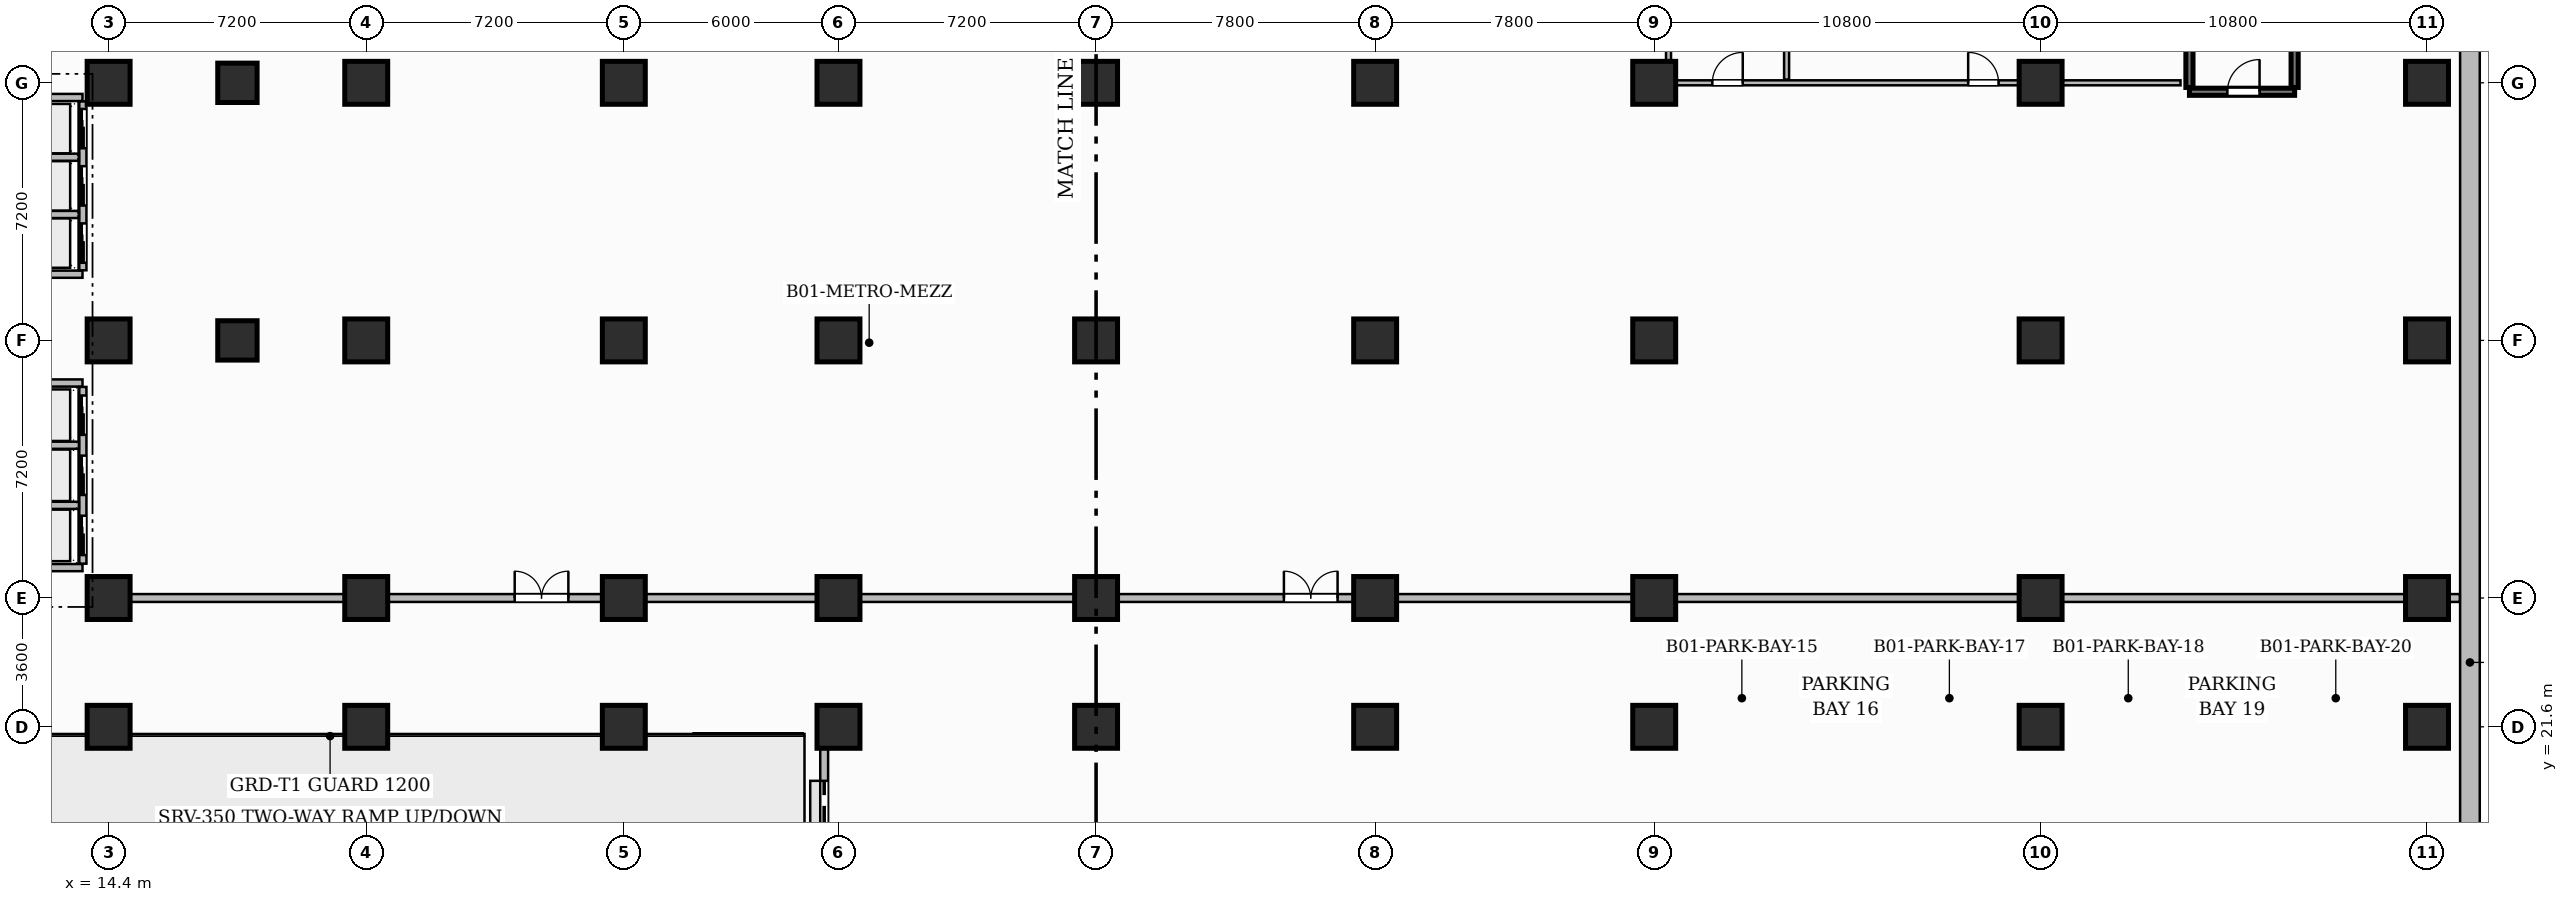
"""IFC4 building model, lengths in metres.
Left out: names, types, materials, properties, quantities, classifications, styles, units other than length and angle.
Written with IfcOpenShell. Run it as: python <this file> out.ifc"""

import sys

from ifc_helpers import new_model, si_unit, direction, frame, frame_2d, origin, origin_2d, place, context, subcontext, project, spatial, rectangle, extrude, source, transform, mapped, element, fill, save


model = new_model("IFC4")
c1 = context("Model", 3, precision=1e-05, world=origin(), true_north=direction((0.0, 1.0)))
c2 = subcontext(c1, "Body", "Model", "MODEL_VIEW")
j1 = project(units=[si_unit("LENGTHUNIT", "METRE"), si_unit("PLANEANGLEUNIT", "RADIAN")], contexts=[c1])
p1 = place(None, origin())
s1 = spatial("IfcSite", under=j1, at=p1, CompositionType="ELEMENT")
p2 = place(p1, origin())
s2 = spatial("IfcBuilding", under=s1, at=p2, CompositionType="ELEMENT")
p3 = place(p2, frame((0.0, 0.0, -6.5)))
s3 = spatial("IfcBuildingStorey", under=s2, at=p3, CompositionType="ELEMENT", Elevation=-6.5)
p4 = place(p3, frame((80.4, 0.35, 0.0), z_axis=(0.0, 0.0, 1.0), x_axis=(0.0, 1.0, 0.0)))
e1 = element("IfcWall", 1, at=p4, inside=s3, PredefinedType="USERDEFINED", context=c2, shape_type="SweptSolid", body=[
    extrude(rectangle(XDim=46.1, YDim=0.55, at=frame_2d((23.05, 0.0))), origin(), (0.0, 0.0, 1.0), 6.5),
])
m1 = source(origin(), c2, "Body", "SweptSolid", [
    extrude(rectangle(XDim=1.2, YDim=1.2, at=origin_2d()), origin(), (0.0, 0.0, 1.0), 6.5),
])
for number, where, z_axis, x_axis in (
    (2, (14.4, 21.6, 0.0), (0.0, 0.0, 1.0), (1.0, 0.0, 0.0)),
    (3, (14.4, 25.2, 0.0), (0.0, 0.0, 1.0), (1.0, 0.0, 0.0)),
    (4, (14.4, 32.4, 0.0), (0.0, 0.0, 1.0), (1.0, 0.0, 0.0)),
    (5, (14.4, 39.6, 0.0), (0.0, 0.0, 1.0), (1.0, 0.0, 0.0)),
    (6, (21.6, 21.6, 0.0), (0.0, 0.0, 1.0), (1.0, 0.0, 0.0)),
    (7, (21.6, 25.2, 0.0), (0.0, 0.0, 1.0), (1.0, 0.0, 0.0)),
    (8, (21.6, 32.4, 0.0), (0.0, 0.0, 1.0), (1.0, 0.0, 0.0)),
    (9, (21.6, 39.6, 0.0), (0.0, 0.0, 1.0), (1.0, 0.0, 0.0)),
    (10, (28.8, 21.6, 0.0), (0.0, 0.0, 1.0), (1.0, 0.0, 0.0)),
    (11, (28.8, 25.2, 0.0), (0.0, 0.0, 1.0), (1.0, 0.0, 0.0)),
    (12, (28.8, 32.4, 0.0), (0.0, 0.0, 1.0), (1.0, 0.0, 0.0)),
    (13, (28.8, 39.6, 0.0), (0.0, 0.0, 1.0), (1.0, 0.0, 0.0)),
    (14, (34.8, 21.6, 0.0), (0.0, 0.0, 1.0), (1.0, 0.0, 0.0)),
    (15, (34.8, 25.2, 0.0), (0.0, 0.0, 1.0), (1.0, 0.0, 0.0)),
    (16, (34.8, 32.4, 0.0), (0.0, 0.0, 1.0), (1.0, 0.0, 0.0)),
    (17, (34.8, 39.6, 0.0), (0.0, 0.0, 1.0), (1.0, 0.0, 0.0)),
    (18, (42.0, 21.6, 0.0), (0.0, 0.0, 1.0), (1.0, 0.0, 0.0)),
    (19, (42.0, 25.2, 0.0), (0.0, 0.0, 1.0), (1.0, 0.0, 0.0)),
    (20, (42.0, 32.4, 0.0), (0.0, 0.0, 1.0), (1.0, 0.0, 0.0)),
    (21, (42.0, 39.6, 0.0), (0.0, 0.0, 1.0), (1.0, 0.0, 0.0)),
    (22, (49.8, 21.6, 0.0), (0.0, 0.0, 1.0), (1.0, 0.0, 0.0)),
    (23, (49.8, 25.2, 0.0), (0.0, 0.0, 1.0), (1.0, 0.0, 0.0)),
    (24, (49.8, 32.4, 0.0), (0.0, 0.0, 1.0), (1.0, 0.0, 0.0)),
    (25, (49.8, 39.6, 0.0), (0.0, 0.0, 1.0), (1.0, 0.0, 0.0)),
    (26, (57.6, 21.6, 0.0), (0.0, 0.0, 1.0), (1.0, 0.0, 0.0)),
    (27, (57.6, 25.2, 0.0), (0.0, 0.0, 1.0), (1.0, 0.0, 0.0)),
    (28, (57.6, 32.4, 0.0), (0.0, 0.0, 1.0), (1.0, 0.0, 0.0)),
    (29, (57.6, 39.6, 0.0), (0.0, 0.0, 1.0), (1.0, 0.0, 0.0)),
    (30, (68.4, 21.6, 0.0), (0.0, 0.0, 1.0), (1.0, 0.0, 0.0)),
    (31, (68.4, 25.2, 0.0), (0.0, 0.0, 1.0), (1.0, 0.0, 0.0)),
    (32, (68.4, 32.4, 0.0), (0.0, 0.0, 1.0), (1.0, 0.0, 0.0)),
    (33, (68.4, 39.6, 0.0), (0.0, 0.0, 1.0), (1.0, 0.0, 0.0)),
    (34, (79.2, 21.6, 0.0), (0.0, 0.0, 1.0), (1.0, 0.0, 0.0)),
    (35, (79.2, 25.2, 0.0), (0.0, 0.0, 1.0), (1.0, 0.0, 0.0)),
    (36, (79.2, 32.4, 0.0), (0.0, 0.0, 1.0), (1.0, 0.0, 0.0)),
    (37, (79.2, 39.6, 0.0), (0.0, 0.0, 1.0), (1.0, 0.0, 0.0)),
):
    element("IfcColumn", number, at=place(p3, frame(where, z_axis=z_axis, x_axis=x_axis)), inside=s3, PredefinedType="COLUMN", context=c2, shape_type="MappedRepresentation", body=[
        mapped(m1, transform((0.0, 0.0, 0.0), scale=1.0)),
    ])
m2 = source(origin(), c2, "Body", "SweptSolid", [
    extrude(rectangle(XDim=1.1, YDim=1.1, at=origin_2d()), origin(), (0.0, 0.0, 1.0), 6.5),
])
for number, where, z_axis, x_axis in (
    (38, (18.0, 32.4, 0.0), (0.0, 0.0, 1.0), (1.0, 0.0, 0.0)),
    (39, (18.0, 39.6, 0.0), (0.0, 0.0, 1.0), (1.0, 0.0, 0.0)),
):
    element("IfcColumn", number, at=place(p3, frame(where, z_axis=z_axis, x_axis=x_axis)), inside=s3, PredefinedType="COLUMN", context=c2, shape_type="MappedRepresentation", body=[
        mapped(m2, transform((0.0, 0.0, 0.0), scale=1.0)),
    ])
for number, where, z_axis, x_axis in (
    (40, (11.71, 26.05, 0.0), (0.0, 0.0, 1.0), (1.0, 0.0, 0.0)),
    (41, (11.71, 31.21, 0.0), (0.0, 0.0, 1.0), (1.0, 0.0, 0.0)),
):
    element("IfcWall", number, at=place(p3, frame(where, z_axis=z_axis, x_axis=x_axis)), inside=s3, PredefinedType="PARTITIONING", context=c2, shape_type="SweptSolid", body=[
        extrude(rectangle(XDim=1.96, YDim=0.2, at=frame_2d((0.98, 0.0))), origin(), (0.0, 0.0, 1.0), 6.1),
    ])
p5 = place(p3, frame((13.68, 26.16, 0.0), z_axis=(0.0, 0.0, 1.0), x_axis=(0.0, 1.0, 0.0)))
e42 = element("IfcWall", 42, at=p5, inside=s3, PredefinedType="PARTITIONING", context=c2, shape_type="SweptSolid", body=[
    extrude(rectangle(XDim=4.94, YDim=0.2, at=frame_2d((2.47, 0.0))), origin(), (0.0, 0.0, 1.0), 6.1),
])
p6 = place(p5, frame((0.24, 0.0, 0.0)))
e43 = element("IfcOpeningElement", 43, at=p6, cuts=e42, PredefinedType="OPENING", context=c2, shape_type="SweptSolid", body=[
    extrude(rectangle(XDim=1.1, YDim=2.2, at=frame_2d((0.55, 1.1))), frame((0.0, 0.11, 0.0), z_axis=(0.0, -1.0, 0.0), x_axis=(1.0, 0.0, 0.0)), (0.0, 0.0, 1.0), 0.22),
])
p7 = place(p5, frame((1.92, 0.0, 0.0)))
e44 = element("IfcOpeningElement", 44, at=p7, cuts=e42, PredefinedType="OPENING", context=c2, shape_type="SweptSolid", body=[
    extrude(rectangle(XDim=1.1, YDim=2.2, at=frame_2d((0.55, 1.1))), frame((0.0, 0.11, 0.0), z_axis=(0.0, -1.0, 0.0), x_axis=(1.0, 0.0, 0.0)), (0.0, 0.0, 1.0), 0.22),
])
p8 = place(p5, frame((3.6, 0.0, 0.0)))
e45 = element("IfcOpeningElement", 45, at=p8, cuts=e42, PredefinedType="OPENING", context=c2, shape_type="SweptSolid", body=[
    extrude(rectangle(XDim=1.1, YDim=2.2, at=frame_2d((0.55, 1.1))), frame((0.0, 0.11, 0.0), z_axis=(0.0, -1.0, 0.0), x_axis=(1.0, 0.0, 0.0)), (0.0, 0.0, 1.0), 0.22),
])
for number, where, z_axis, x_axis in (
    (46, (11.81, 27.79, 0.0), (0.0, 0.0, 1.0), (1.0, 0.0, 0.0)),
    (47, (11.81, 29.47, 0.0), (0.0, 0.0, 1.0), (1.0, 0.0, 0.0)),
):
    element("IfcWall", number, at=place(p3, frame(where, z_axis=z_axis, x_axis=x_axis)), inside=s3, PredefinedType="PARTITIONING", context=c2, shape_type="SweptSolid", body=[
        extrude(rectangle(XDim=1.76, YDim=0.2, at=frame_2d((0.88, 0.0))), origin(), (0.0, 0.0, 1.0), 6.1),
    ])
p9 = place(p3, frame((11.71, 34.25, 0.0), z_axis=(0.0, 0.0, 1.0), x_axis=(1.0, 0.0, 0.0)))
e48 = element("IfcWall", 48, at=p9, inside=s3, PredefinedType="PARTITIONING", context=c2, shape_type="SweptSolid", body=[
    extrude(rectangle(XDim=1.96, YDim=0.2, at=frame_2d((0.98, 0.0))), origin(), (0.0, 0.0, 1.0), 6.1),
])
p10 = place(p3, frame((11.71, 39.19, 0.0), z_axis=(0.0, 0.0, 1.0), x_axis=(1.0, 0.0, 0.0)))
e49 = element("IfcWall", 49, at=p10, inside=s3, PredefinedType="PARTITIONING", context=c2, shape_type="SweptSolid", body=[
    extrude(rectangle(XDim=1.96, YDim=0.2, at=frame_2d((0.98, 0.0))), origin(), (0.0, 0.0, 1.0), 5.185),
])
p11 = place(p3, frame((13.68, 34.36, 0.0), z_axis=(0.0, 0.0, 1.0), x_axis=(0.0, 1.0, 0.0)))
e50 = element("IfcWall", 50, at=p11, inside=s3, PredefinedType="PARTITIONING", context=c2, shape_type="SweptSolid", body=[
    extrude(rectangle(XDim=4.72, YDim=0.2, at=frame_2d((2.36, 0.0))), origin(), (0.0, 0.0, 1.0), 6.1),
])
p12 = place(p11, frame((0.21, 0.0, 0.0)))
e51 = element("IfcOpeningElement", 51, at=p12, cuts=e50, PredefinedType="OPENING", context=c2, shape_type="SweptSolid", body=[
    extrude(rectangle(XDim=1.1, YDim=2.2, at=frame_2d((0.55, 1.1))), frame((0.0, 0.11, 0.0), z_axis=(0.0, -1.0, 0.0), x_axis=(1.0, 0.0, 0.0)), (0.0, 0.0, 1.0), 0.22),
])
p13 = place(p11, frame((1.81, 0.0, 0.0)))
e52 = element("IfcOpeningElement", 52, at=p13, cuts=e50, PredefinedType="OPENING", context=c2, shape_type="SweptSolid", body=[
    extrude(rectangle(XDim=1.1, YDim=2.2, at=frame_2d((0.55, 1.1))), frame((0.0, 0.11, 0.0), z_axis=(0.0, -1.0, 0.0), x_axis=(1.0, 0.0, 0.0)), (0.0, 0.0, 1.0), 0.22),
])
p14 = place(p11, frame((3.41, 0.0, 0.0)))
e53 = element("IfcOpeningElement", 53, at=p14, cuts=e50, PredefinedType="OPENING", context=c2, shape_type="SweptSolid", body=[
    extrude(rectangle(XDim=1.1, YDim=2.2, at=frame_2d((0.55, 1.1))), frame((0.0, 0.11, 0.0), z_axis=(0.0, -1.0, 0.0), x_axis=(1.0, 0.0, 0.0)), (0.0, 0.0, 1.0), 0.22),
])
for number, where, z_axis, x_axis in (
    (54, (11.81, 35.92, 0.0), (0.0, 0.0, 1.0), (1.0, 0.0, 0.0)),
    (55, (11.81, 37.52, 0.0), (0.0, 0.0, 1.0), (1.0, 0.0, 0.0)),
):
    element("IfcWall", number, at=place(p3, frame(where, z_axis=z_axis, x_axis=x_axis)), inside=s3, PredefinedType="PARTITIONING", context=c2, shape_type="SweptSolid", body=[
        extrude(rectangle(XDim=1.76, YDim=0.2, at=frame_2d((0.88, 0.0))), origin(), (0.0, 0.0, 1.0), 6.1),
    ])
for number, where, z_axis, x_axis in (
    (56, (72.56, 39.47, 0.0), (0.0, 0.0, 1.0), (0.0, 1.0, 0.0)),
    (57, (75.5, 39.47, 0.0), (0.0, 0.0, 1.0), (0.0, 1.0, 0.0)),
):
    element("IfcWall", number, at=place(p3, frame(where, z_axis=z_axis, x_axis=x_axis)), inside=s3, PredefinedType="SHEAR", context=c2, shape_type="SweptSolid", body=[
        extrude(rectangle(XDim=6.91, YDim=0.2, at=frame_2d((3.455, 0.0))), origin(), (0.0, 0.0, 1.0), 6.5),
    ])
p15 = place(p3, frame((72.56, 39.35, 0.0), z_axis=(0.0, 0.0, 1.0), x_axis=(1.0, 0.0, 0.0)))
e58 = element("IfcWall", 58, at=p15, inside=s3, PredefinedType="SHEAR", context=c2, shape_type="SweptSolid", body=[
    extrude(rectangle(XDim=2.94, YDim=0.2, at=frame_2d((1.47, 0.0))), origin(), (0.0, 0.0, 1.0), 6.5),
])
p16 = place(p15, frame((1.06, 0.0, 0.0)))
e59 = element("IfcOpeningElement", 59, at=p16, cuts=e58, PredefinedType="OPENING", context=c2, shape_type="SweptSolid", body=[
    extrude(rectangle(XDim=0.9, YDim=2.1, at=frame_2d((0.45, 1.05))), frame((0.0, 0.11, 0.0), z_axis=(0.0, -1.0, 0.0), x_axis=(1.0, 0.0, 0.0)), (0.0, 0.0, 1.0), 0.22),
])
p17 = place(p3, frame((13.84, 25.2, 0.0), z_axis=(0.0, 0.0, 1.0), x_axis=(1.0, 0.0, 0.0)))
e60 = element("IfcWall", 60, at=p17, inside=s3, PredefinedType="PARTITIONING", context=c2, shape_type="SweptSolid", body=[
    extrude(rectangle(XDim=66.277, YDim=0.22, at=frame_2d((33.138, 0.0))), origin(), (0.0, 0.0, 1.0), 5.185),
])
p18 = place(p17, frame((11.91, 0.0, 0.0)))
e61 = element("IfcOpeningElement", 61, at=p18, cuts=e60, PredefinedType="OPENING", context=c2, shape_type="SweptSolid", body=[
    extrude(rectangle(XDim=1.5, YDim=2.2, at=frame_2d((0.75, 1.1))), frame((0.0, 0.12, 0.0), z_axis=(0.0, -1.0, 0.0), x_axis=(1.0, 0.0, 0.0)), (0.0, 0.0, 1.0), 0.24),
])
p19 = place(p17, frame((33.41, 0.0, 0.0)))
e62 = element("IfcOpeningElement", 62, at=p19, cuts=e60, PredefinedType="OPENING", context=c2, shape_type="SweptSolid", body=[
    extrude(rectangle(XDim=1.5, YDim=2.2, at=frame_2d((0.75, 1.1))), frame((0.0, 0.12, 0.0), z_axis=(0.0, -1.0, 0.0), x_axis=(1.0, 0.0, 0.0)), (0.0, 0.0, 1.0), 0.24),
])
p20 = place(p3, frame((58.09, 39.6, 0.0), z_axis=(0.0, 0.0, 1.0), x_axis=(1.0, 0.0, 0.0)))
e63 = element("IfcWall", 63, at=p20, inside=s3, PredefinedType="PARTITIONING", context=c2, shape_type="SweptSolid", body=[
    extrude(rectangle(XDim=14.22, YDim=0.14, at=frame_2d((7.11, 0.0))), origin(), (0.0, 0.0, 1.0), 5.185),
])
p21 = place(p20, frame((1.135, 0.0, 0.0)))
e64 = element("IfcOpeningElement", 64, at=p21, cuts=e63, PredefinedType="OPENING", context=c2, shape_type="SweptSolid", body=[
    extrude(rectangle(XDim=0.85, YDim=2.1, at=frame_2d((0.425, 1.05))), frame((0.0, 0.08, 0.0), z_axis=(0.0, -1.0, 0.0), x_axis=(1.0, 0.0, 0.0)), (0.0, 0.0, 1.0), 0.16),
])
p22 = place(p20, frame((8.285, 0.0, 0.0)))
e65 = element("IfcOpeningElement", 65, at=p22, cuts=e63, PredefinedType="OPENING", context=c2, shape_type="SweptSolid", body=[
    extrude(rectangle(XDim=0.85, YDim=2.1, at=frame_2d((0.425, 1.05))), frame((0.0, 0.08, 0.0), z_axis=(0.0, -1.0, 0.0), x_axis=(1.0, 0.0, 0.0)), (0.0, 0.0, 1.0), 0.16),
])
p23 = place(p3, frame((58.0, 39.69, 0.0), z_axis=(0.0, 0.0, 1.0), x_axis=(0.0, 1.0, 0.0)))
e66 = element("IfcWall", 66, at=p23, inside=s3, PredefinedType="PARTITIONING", context=c2, shape_type="SweptSolid", body=[
    extrude(rectangle(XDim=6.62, YDim=0.14, at=frame_2d((3.31, 0.0))), origin(), (0.0, 0.0, 1.0), 5.185),
])
p24 = place(p3, frame((61.3, 39.69, 0.0), z_axis=(0.0, 0.0, 1.0), x_axis=(0.0, 1.0, 0.0)))
e67 = element("IfcWall", 67, at=p24, inside=s3, PredefinedType="PARTITIONING", context=c2, shape_type="SweptSolid", body=[
    extrude(rectangle(XDim=6.827, YDim=0.14, at=frame_2d((3.414, 0.0))), origin(), (0.0, 0.0, 1.0), 6.1),
])
p25 = place(p3, frame((34.4, 14.74, 0.0), z_axis=(0.0, 0.0, 1.0), x_axis=(0.0, 1.0, 0.0)))
e68 = element("IfcWall", 68, at=p25, inside=s3, PredefinedType="PARTITIONING", context=c2, shape_type="SweptSolid", body=[
    extrude(rectangle(XDim=6.72, YDim=0.22, at=frame_2d((3.36, 0.0))), origin(), (0.0, 0.0, 1.0), 5.185),
])
p26 = place(p25, frame((1.35, 0.0, 0.0)))
e69 = element("IfcOpeningElement", 69, at=p26, cuts=e68, PredefinedType="OPENING", context=c2, shape_type="SweptSolid", body=[
    extrude(rectangle(XDim=4.0, YDim=3.2, at=frame_2d((2.0, 1.6))), frame((0.0, 0.12, 0.0), z_axis=(0.0, -1.0, 0.0), x_axis=(1.0, 0.0, 0.0)), (0.0, 0.0, 1.0), 0.24),
])
m3 = source(origin(), c2, "Body", "SweptSolid", [
    extrude(rectangle(XDim=0.9, YDim=2.1, at=frame_2d((0.45, 1.05))), frame((0.0, 0.025, 0.0), z_axis=(0.0, -1.0, 0.0), x_axis=(1.0, 0.0, 0.0)), (0.0, 0.0, 1.0), 0.05),
])
p27 = place(p16, origin())
e70 = element("IfcDoor", 70, at=p27, inside=s3, OperationType="SINGLE_SWING_RIGHT", PredefinedType="DOOR", context=c2, shape_type="MappedRepresentation", body=[
    mapped(m3, transform((0.0, 0.0, 0.0), scale=1.0)),
])
fill(e59, e70)
m4 = source(origin(), c2, "Body", "SweptSolid", [
    extrude(rectangle(XDim=1.5, YDim=2.2, at=frame_2d((0.75, 1.1))), frame((0.0, 0.025, 0.0), z_axis=(0.0, -1.0, 0.0), x_axis=(1.0, 0.0, 0.0)), (0.0, 0.0, 1.0), 0.05),
])
p28 = place(p18, origin())
e71 = element("IfcDoor", 71, at=p28, inside=s3, OperationType="DOUBLE_DOOR_SINGLE_SWING", PredefinedType="DOOR", context=c2, shape_type="MappedRepresentation", body=[
    mapped(m4, transform((0.0, 0.0, 0.0), scale=1.0)),
])
fill(e61, e71)
p29 = place(p19, origin())
e72 = element("IfcDoor", 72, at=p29, inside=s3, OperationType="DOUBLE_DOOR_SINGLE_SWING", PredefinedType="DOOR", context=c2, shape_type="MappedRepresentation", body=[
    mapped(m4, transform((0.0, 0.0, 0.0), scale=1.0)),
])
fill(e62, e72)
m5 = source(origin(), c2, "Body", "SweptSolid", [
    extrude(rectangle(XDim=0.85, YDim=2.1, at=frame_2d((0.425, 1.05))), frame((0.0, 0.025, 0.0), z_axis=(0.0, -1.0, 0.0), x_axis=(1.0, 0.0, 0.0)), (0.0, 0.0, 1.0), 0.05),
])
p30 = place(p21, origin())
e73 = element("IfcDoor", 73, at=p30, inside=s3, OperationType="SINGLE_SWING_RIGHT", PredefinedType="DOOR", context=c2, shape_type="MappedRepresentation", body=[
    mapped(m5, transform((0.0, 0.0, 0.0), scale=1.0)),
])
fill(e64, e73)
p31 = place(p22, origin())
e74 = element("IfcDoor", 74, at=p31, inside=s3, OperationType="SINGLE_SWING_LEFT", PredefinedType="DOOR", context=c2, shape_type="MappedRepresentation", body=[
    mapped(m5, transform((0.0, 0.0, 0.0), scale=1.0)),
])
fill(e65, e74)
m6 = source(origin(), c2, "Body", "SweptSolid", [
    extrude(rectangle(XDim=4.0, YDim=3.2, at=frame_2d((2.0, 1.6))), frame((0.0, 0.025, 0.0), z_axis=(0.0, -1.0, 0.0), x_axis=(1.0, 0.0, 0.0)), (0.0, 0.0, 1.0), 0.05),
])
p32 = place(p26, origin())
e75 = element("IfcDoor", 75, at=p32, inside=s3, OperationType="ROLLINGUP", PredefinedType="GATE", context=c2, shape_type="MappedRepresentation", body=[
    mapped(m6, transform((0.0, 0.0, 0.0), scale=1.0)),
])
fill(e69, e75)
m7 = source(origin(), c2, "Body", "SweptSolid", [
    extrude(rectangle(XDim=1.1, YDim=2.2, at=frame_2d((0.55, 1.1))), frame((0.0, 0.025, 0.0), z_axis=(0.0, -1.0, 0.0), x_axis=(1.0, 0.0, 0.0)), (0.0, 0.0, 1.0), 0.05),
])
p33 = place(p6, origin())
e76 = element("IfcDoor", 76, at=p33, inside=s3, OperationType="SLIDING_TO_LEFT", PredefinedType="DOOR", context=c2, shape_type="MappedRepresentation", body=[
    mapped(m7, transform((0.0, 0.0, 0.0), scale=1.0)),
])
fill(e43, e76)
p34 = place(p7, origin())
e77 = element("IfcDoor", 77, at=p34, inside=s3, OperationType="SLIDING_TO_LEFT", PredefinedType="DOOR", context=c2, shape_type="MappedRepresentation", body=[
    mapped(m7, transform((0.0, 0.0, 0.0), scale=1.0)),
])
fill(e44, e77)
p35 = place(p8, origin())
e78 = element("IfcDoor", 78, at=p35, inside=s3, OperationType="SLIDING_TO_LEFT", PredefinedType="DOOR", context=c2, shape_type="MappedRepresentation", body=[
    mapped(m7, transform((0.0, 0.0, 0.0), scale=1.0)),
])
fill(e45, e78)
p36 = place(p12, origin())
e79 = element("IfcDoor", 79, at=p36, inside=s3, OperationType="SLIDING_TO_LEFT", PredefinedType="DOOR", context=c2, shape_type="MappedRepresentation", body=[
    mapped(m7, transform((0.0, 0.0, 0.0), scale=1.0)),
])
fill(e51, e79)
p37 = place(p13, origin())
e80 = element("IfcDoor", 80, at=p37, inside=s3, OperationType="SLIDING_TO_LEFT", PredefinedType="DOOR", context=c2, shape_type="MappedRepresentation", body=[
    mapped(m7, transform((0.0, 0.0, 0.0), scale=1.0)),
])
fill(e52, e80)
p38 = place(p14, origin())
e81 = element("IfcDoor", 81, at=p38, inside=s3, OperationType="SLIDING_TO_LEFT", PredefinedType="DOOR", context=c2, shape_type="MappedRepresentation", body=[
    mapped(m7, transform((0.0, 0.0, 0.0), scale=1.0)),
])
fill(e53, e81)
save(model, sys.argv[1])
